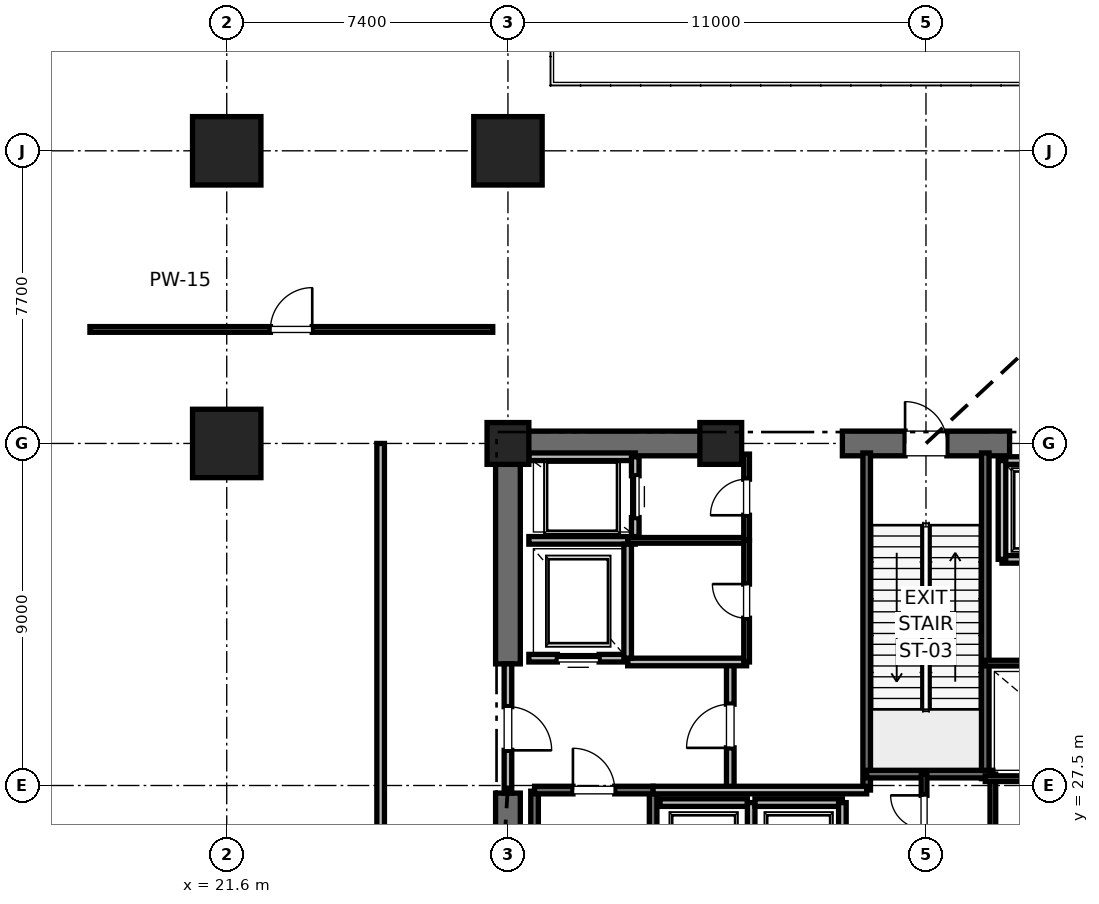
"""IFC4 building model, lengths in metres.
Left out: names, types, materials, properties, quantities, classifications, styles, units other than length and angle.
Written with IfcOpenShell. Run it as: python <this file> out.ifc"""

import sys

from ifc_helpers import new_model, si_unit, direction, frame, frame_2d, origin, origin_2d, place, context, subcontext, project, spatial, rectangle, extrude, element, fill, save


model = new_model("IFC4")
c1 = context("Model", 3, precision=1e-05, world=origin(), true_north=direction((0.0, 1.0)))
c2 = subcontext(c1, "Body", "Model", "MODEL_VIEW")
j1 = project(units=[si_unit("LENGTHUNIT", "METRE"), si_unit("PLANEANGLEUNIT", "RADIAN")], contexts=[c1])
p1 = place(None, origin())
s1 = spatial("IfcSite", under=j1, at=p1, CompositionType="ELEMENT")
p2 = place(p1, origin())
s2 = spatial("IfcBuilding", under=s1, at=p2, CompositionType="ELEMENT")
p3 = place(p2, origin())
s3 = spatial("IfcBuildingStorey", under=s2, at=p3, CompositionType="ELEMENT", Elevation=0.0)
for number, where, z_axis, x_axis in (
    (1, (29.0, 44.2, 0.0), (0.0, 0.0, 1.0), (1.0, 0.0, 0.0)),
    (2, (21.6, 36.5, 0.0), (0.0, 0.0, 1.0), (1.0, 0.0, 0.0)),
    (3, (21.6, 44.2, 0.0), (0.0, 0.0, 1.0), (1.0, 0.0, 0.0)),
):
    element("IfcColumn", number, at=place(p3, frame(where, z_axis=z_axis, x_axis=x_axis)), inside=s3, PredefinedType="COLUMN", context=c2, shape_type="SweptSolid", body=[
        extrude(rectangle(XDim=1.8, YDim=1.8, at=origin_2d()), origin(), (0.0, 0.0, 1.0), 6.0),
    ])
for number, where, z_axis, x_axis in (
    (4, (29.0, 36.5, 0.0), (0.0, 0.0, 1.0), (1.0, 0.0, 0.0)),
    (5, (34.6, 36.5, 0.0), (0.0, 0.0, 1.0), (1.0, 0.0, 0.0)),
):
    element("IfcColumn", number, at=place(p3, frame(where, z_axis=z_axis, x_axis=x_axis)), inside=s3, PredefinedType="PILASTER", context=c2, shape_type="SweptSolid", body=[
        extrude(rectangle(XDim=1.1, YDim=1.1, at=origin_2d()), origin(), (0.0, 0.0, 1.0), 6.0),
    ])
p4 = place(p3, frame((29.0, 36.5, 0.0), z_axis=(0.0, 0.0, 1.0), x_axis=(1.0, 0.0, 0.0)))
e6 = element("IfcWall", 6, at=p4, inside=s3, PredefinedType="SHEAR", context=c2, shape_type="SweptSolid", body=[
    extrude(rectangle(XDim=5.8, YDim=0.65, at=frame_2d((2.9, 0.0))), origin(), (0.0, 0.0, 1.0), 5.72),
])
p5 = place(p3, frame((37.8, 36.5, 0.0), z_axis=(0.0, 0.0, 1.0), x_axis=(1.0, 0.0, 0.0)))
e7 = element("IfcWall", 7, at=p5, inside=s3, PredefinedType="SHEAR", context=c2, shape_type="SweptSolid", body=[
    extrude(rectangle(XDim=4.4, YDim=0.65, at=frame_2d((2.2, 0.0))), origin(), (0.0, 0.0, 1.0), 5.72),
])
p6 = place(p5, frame((1.65, 0.0, 0.0)))
e8 = element("IfcOpeningElement", 8, at=p6, cuts=e7, PredefinedType="OPENING", context=c2, shape_type="SweptSolid", body=[
    extrude(rectangle(XDim=1.1, YDim=2.15, at=frame_2d((0.55, 1.075))), frame((0.0, 0.325, 0.0), z_axis=(0.0, -1.0, 0.0), x_axis=(1.0, 0.0, 0.0)), (0.0, 0.0, 1.0), 0.65),
])
p7 = place(p3, frame((29.0, 18.5, 0.0), z_axis=(0.0, 0.0, 1.0), x_axis=(0.0, 1.0, 0.0)))
e9 = element("IfcWall", 9, at=p7, inside=s3, PredefinedType="SHEAR", context=c2, shape_type="SweptSolid", body=[
    extrude(rectangle(XDim=8.8, YDim=0.65, at=frame_2d((4.4, 0.0))), origin(), (0.0, 0.0, 1.0), 5.72),
])
p8 = place(p3, frame((29.0, 30.7, 0.0), z_axis=(0.0, 0.0, 1.0), x_axis=(0.0, 1.0, 0.0)))
e10 = element("IfcWall", 10, at=p8, inside=s3, PredefinedType="SHEAR", context=c2, shape_type="SweptSolid", body=[
    extrude(rectangle(XDim=5.8, YDim=0.65, at=frame_2d((2.9, 0.0))), origin(), (0.0, 0.0, 1.0), 5.72),
])
p9 = place(p3, frame((29.7, 19.2, 0.0), z_axis=(0.0, 0.0, 1.0), x_axis=(0.0, 1.0, 0.0)))
e11 = element("IfcWall", 11, at=p9, inside=s3, PredefinedType="SOLIDWALL", context=c2, shape_type="SweptSolid", body=[
    extrude(rectangle(XDim=8.15, YDim=0.2, at=frame_2d((4.075, 0.0))), origin(), (0.0, 0.0, 1.0), 5.72),
])
p10 = place(p3, frame((32.82, 18.6, 0.0), z_axis=(0.0, 0.0, 1.0), x_axis=(0.0, 1.0, 0.0)))
e12 = element("IfcWall", 12, at=p10, inside=s3, PredefinedType="SOLIDWALL", context=c2, shape_type="SweptSolid", body=[
    extrude(rectangle(XDim=8.78, YDim=0.2, at=frame_2d((4.39, 0.0))), origin(), (0.0, 0.0, 1.0), 5.72),
])
p11 = place(p3, frame((29.7, 27.38, 0.0), z_axis=(0.0, 0.0, 1.0), x_axis=(1.0, 0.0, 0.0)))
e13 = element("IfcWall", 13, at=p11, inside=s3, PredefinedType="SOLIDWALL", context=c2, shape_type="SweptSolid", body=[
    extrude(rectangle(XDim=3.12, YDim=0.2, at=frame_2d((1.56, 0.0))), origin(), (0.0, 0.0, 1.0), 5.72),
])
p12 = place(p11, frame((1.01, 0.0, 0.0)))
e14 = element("IfcOpeningElement", 14, at=p12, cuts=e13, PredefinedType="OPENING", context=c2, shape_type="SweptSolid", body=[
    extrude(rectangle(XDim=1.1, YDim=2.15, at=frame_2d((0.55, 1.075))), frame((0.0, 0.1, 0.0), z_axis=(0.0, -1.0, 0.0), x_axis=(1.0, 0.0, 0.0)), (0.0, 0.0, 1.0), 0.2),
])
p13 = place(p3, frame((38.44, 27.38, 0.0), z_axis=(0.0, 0.0, 1.0), x_axis=(0.0, 1.0, 0.0)))
e15 = element("IfcWall", 15, at=p13, inside=s3, PredefinedType="SOLIDWALL", context=c2, shape_type="SweptSolid", body=[
    extrude(rectangle(XDim=8.87, YDim=0.2, at=frame_2d((4.435, 0.0))), origin(), (0.0, 0.0, 1.0), 5.72),
])
p14 = place(p3, frame((41.56, 27.68, 0.0), z_axis=(0.0, 0.0, 1.0), x_axis=(0.0, 1.0, 0.0)))
e16 = element("IfcWall", 16, at=p14, inside=s3, PredefinedType="SOLIDWALL", context=c2, shape_type="SweptSolid", body=[
    extrude(rectangle(XDim=8.57, YDim=0.2, at=frame_2d((4.285, 0.0))), origin(), (0.0, 0.0, 1.0), 5.72),
])
p15 = place(p3, frame((38.44, 27.8, 0.0), z_axis=(0.0, 0.0, 1.0), x_axis=(1.0, 0.0, 0.0)))
e17 = element("IfcWall", 17, at=p15, inside=s3, PredefinedType="SOLIDWALL", context=c2, shape_type="SweptSolid", body=[
    extrude(rectangle(XDim=3.32, YDim=0.2, at=frame_2d((1.66, 0.0))), origin(), (0.0, 0.0, 1.0), 5.72),
])
p16 = place(p3, frame((34.85, 27.38, 0.0), z_axis=(0.0, 0.0, 1.0), x_axis=(0.0, 1.0, 0.0)))
e18 = element("IfcWall", 18, at=p16, inside=s3, PredefinedType="PARTITIONING", context=c2, shape_type="SweptSolid", body=[
    extrude(rectangle(XDim=3.37, YDim=0.2, at=frame_2d((1.685, 0.0))), origin(), (0.0, 0.0, 1.0), 5.72),
])
p17 = place(p16, frame((1.11, 0.0, 0.0)))
e19 = element("IfcOpeningElement", 19, at=p17, cuts=e18, PredefinedType="OPENING", context=c2, shape_type="SweptSolid", body=[
    extrude(rectangle(XDim=1.15, YDim=2.2, at=frame_2d((0.575, 1.1))), frame((0.0, 0.1, 0.0), z_axis=(0.0, -1.0, 0.0), x_axis=(1.0, 0.0, 0.0)), (0.0, 0.0, 1.0), 0.2),
])
p18 = place(p3, frame((29.0, 30.7, 0.0), z_axis=(0.0, 0.0, 1.0), x_axis=(0.0, -1.0, 0.0)))
e20 = element("IfcWall", 20, at=p18, inside=s3, PredefinedType="PARTITIONING", context=c2, shape_type="SweptSolid", body=[
    extrude(rectangle(XDim=3.4, YDim=0.2, at=frame_2d((1.7, 0.0))), origin(), (0.0, 0.0, 1.0), 4.5),
])
p19 = place(p18, frame((1.125, 0.0, 0.0)))
e21 = element("IfcOpeningElement", 21, at=p19, cuts=e20, PredefinedType="OPENING", context=c2, shape_type="SweptSolid", body=[
    extrude(rectangle(XDim=1.15, YDim=2.2, at=frame_2d((0.575, 1.1))), frame((0.0, 0.1, 0.0), z_axis=(0.0, -1.0, 0.0), x_axis=(1.0, 0.0, 0.0)), (0.0, 0.0, 1.0), 0.2),
])
p20 = place(p3, frame((32.82, 27.38, 0.0), z_axis=(0.0, 0.0, 1.0), x_axis=(1.0, 0.0, 0.0)))
e22 = element("IfcWall", 22, at=p20, inside=s3, PredefinedType="PARTITIONING", context=c2, shape_type="SweptSolid", body=[
    extrude(rectangle(XDim=5.62, YDim=0.2, at=frame_2d((2.81, 0.0))), origin(), (0.0, 0.0, 1.0), 5.72),
])
p21 = place(p3, frame((32.15, 30.75, 0.0), z_axis=(0.0, 0.0, 1.0), x_axis=(1.0, 0.0, 0.0)))
e23 = element("IfcWall", 23, at=p21, inside=s3, PredefinedType="PARTITIONING", context=c2, shape_type="SweptSolid", body=[
    extrude(rectangle(XDim=3.13, YDim=0.2, at=frame_2d((1.565, 0.0))), origin(), (0.0, 0.0, 1.0), 5.72),
])
p22 = place(p3, frame((29.55, 30.85, 0.0), z_axis=(0.0, 0.0, 1.0), x_axis=(1.0, 0.0, 0.0)))
e24 = element("IfcWall", 24, at=p22, inside=s3, PredefinedType="SOLIDWALL", context=c2, shape_type="SweptSolid", body=[
    extrude(rectangle(XDim=2.6, YDim=0.2, at=frame_2d((1.3, 0.0))), origin(), (0.0, 0.0, 1.0), 4.5),
])
p23 = place(p22, frame((0.75, 0.0, 0.0)))
e25 = element("IfcOpeningElement", 25, at=p23, cuts=e24, PredefinedType="OPENING", context=c2, shape_type="SweptSolid", body=[
    extrude(rectangle(XDim=1.1, YDim=2.2, at=frame_2d((0.55, 1.1))), frame((0.0, 0.1, 0.0), z_axis=(0.0, -1.0, 0.0), x_axis=(1.0, 0.0, 0.0)), (0.0, 0.0, 1.0), 0.2),
])
p24 = place(p3, frame((29.55, 33.95, 0.0), z_axis=(0.0, 0.0, 1.0), x_axis=(1.0, 0.0, 0.0)))
e26 = element("IfcWall", 26, at=p24, inside=s3, PredefinedType="SOLIDWALL", context=c2, shape_type="SweptSolid", body=[
    extrude(rectangle(XDim=2.8, YDim=0.2, at=frame_2d((1.4, 0.0))), origin(), (0.0, 0.0, 1.0), 5.72),
])
p25 = place(p3, frame((32.15, 30.85, 0.0), z_axis=(0.0, 0.0, 1.0), x_axis=(0.0, 1.0, 0.0)))
e27 = element("IfcWall", 27, at=p25, inside=s3, PredefinedType="SOLIDWALL", context=c2, shape_type="SweptSolid", body=[
    extrude(rectangle(XDim=3.0, YDim=0.2, at=frame_2d((1.5, 0.0))), origin(), (0.0, 0.0, 1.0), 5.72),
])
p26 = place(p3, frame((32.35, 36.15, 0.0), z_axis=(0.0, 0.0, 1.0), x_axis=(-1.0, 0.0, 0.0)))
e28 = element("IfcWall", 28, at=p26, inside=s3, PredefinedType="SOLIDWALL", context=c2, shape_type="SweptSolid", body=[
    extrude(rectangle(XDim=2.8, YDim=0.2, at=frame_2d((1.4, 0.0))), origin(), (0.0, 0.0, 1.0), 4.779),
])
p27 = place(p3, frame((32.35, 34.05, 0.0), z_axis=(0.0, 0.0, 1.0), x_axis=(0.0, 1.0, 0.0)))
e29 = element("IfcWall", 29, at=p27, inside=s3, PredefinedType="SOLIDWALL", context=c2, shape_type="SweptSolid", body=[
    extrude(rectangle(XDim=2.1, YDim=0.2, at=frame_2d((1.05, 0.0))), origin(), (0.0, 0.0, 1.0), 5.72),
])
p28 = place(p27, frame((0.5, 0.0, 0.0)))
e30 = element("IfcOpeningElement", 30, at=p28, cuts=e29, PredefinedType="OPENING", context=c2, shape_type="SweptSolid", body=[
    extrude(rectangle(XDim=1.1, YDim=2.2, at=frame_2d((0.55, 1.1))), frame((0.0, 0.1, 0.0), z_axis=(0.0, -1.0, 0.0), x_axis=(1.0, 0.0, 0.0)), (0.0, 0.0, 1.0), 0.2),
])
p29 = place(p3, frame((35.3, 27.05, 0.0), z_axis=(0.0, 0.0, 1.0), x_axis=(-1.0, 0.0, 0.0)))
e31 = element("IfcWall", 31, at=p29, inside=s3, PredefinedType="SOLIDWALL", context=c2, shape_type="SweptSolid", body=[
    extrude(rectangle(XDim=2.3, YDim=0.2, at=frame_2d((1.15, 0.0))), origin(), (0.0, 0.0, 1.0), 5.72),
])
p30 = place(p3, frame((35.4, 24.45, 0.0), z_axis=(0.0, 0.0, 1.0), x_axis=(0.0, 1.0, 0.0)))
e32 = element("IfcWall", 32, at=p30, inside=s3, PredefinedType="SOLIDWALL", context=c2, shape_type="SweptSolid", body=[
    extrude(rectangle(XDim=2.6, YDim=0.2, at=frame_2d((1.3, 0.0))), origin(), (0.0, 0.0, 1.0), 5.72),
])
p31 = place(p3, frame((37.8, 27.05, 0.0), z_axis=(0.0, 0.0, 1.0), x_axis=(-1.0, 0.0, 0.0)))
e33 = element("IfcWall", 33, at=p31, inside=s3, PredefinedType="SOLIDWALL", context=c2, shape_type="SweptSolid", body=[
    extrude(rectangle(XDim=2.3, YDim=0.2, at=frame_2d((1.15, 0.0))), origin(), (0.0, 0.0, 1.0), 5.72),
])
p32 = place(p3, frame((37.8, 24.45, 0.0), z_axis=(0.0, 0.0, 1.0), x_axis=(0.0, 1.0, 0.0)))
e34 = element("IfcWall", 34, at=p32, inside=s3, PredefinedType="SOLIDWALL", context=c2, shape_type="SweptSolid", body=[
    extrude(rectangle(XDim=2.6, YDim=0.2, at=frame_2d((1.3, 0.0))), origin(), (0.0, 0.0, 1.0), 5.72),
])
p33 = place(p3, frame((42.0, 33.45, 0.0), z_axis=(0.0, 0.0, 1.0), x_axis=(1.0, 0.0, 0.0)))
e35 = element("IfcWall", 35, at=p33, inside=s3, PredefinedType="SOLIDWALL", context=c2, shape_type="SweptSolid", body=[
    extrude(rectangle(XDim=2.3, YDim=0.2, at=frame_2d((1.15, 0.0))), origin(), (0.0, 0.0, 1.0), 5.72),
])
p34 = place(p33, frame((0.6, 0.0, 0.0)))
e36 = element("IfcOpeningElement", 36, at=p34, cuts=e35, PredefinedType="OPENING", context=c2, shape_type="SweptSolid", body=[
    extrude(rectangle(XDim=1.1, YDim=2.2, at=frame_2d((0.55, 1.1))), frame((0.0, 0.1, 0.0), z_axis=(0.0, -1.0, 0.0), x_axis=(1.0, 0.0, 0.0)), (0.0, 0.0, 1.0), 0.2),
])
p35 = place(p3, frame((44.3, 36.05, 0.0), z_axis=(0.0, 0.0, 1.0), x_axis=(-1.0, 0.0, 0.0)))
e37 = element("IfcWall", 37, at=p35, inside=s3, PredefinedType="SOLIDWALL", context=c2, shape_type="SweptSolid", body=[
    extrude(rectangle(XDim=2.3, YDim=0.2, at=frame_2d((1.15, 0.0))), origin(), (0.0, 0.0, 1.0), 4.5),
])
p36 = place(p3, frame((42.0, 36.05, 0.0), z_axis=(0.0, 0.0, 1.0), x_axis=(0.0, -1.0, 0.0)))
e38 = element("IfcWall", 38, at=p36, inside=s3, PredefinedType="SOLIDWALL", context=c2, shape_type="SweptSolid", body=[
    extrude(rectangle(XDim=2.6, YDim=0.2, at=frame_2d((1.3, 0.0))), origin(), (0.0, 0.0, 1.0), 4.5),
])
p37 = place(p3, frame((41.76, 23.8, 0.0), z_axis=(0.0, 0.0, 1.0), x_axis=(0.0, 1.0, 0.0)))
e39 = element("IfcWall", 39, at=p37, inside=s3, PredefinedType="PARTITIONING", context=c2, shape_type="SweptSolid", body=[
    extrude(rectangle(XDim=4.0, YDim=0.15, at=frame_2d((2.0, 0.0))), origin(), (0.0, 0.0, 1.0), 2.85),
])
p38 = place(p3, frame((39.95, 25.8, 0.0), z_axis=(0.0, 0.0, 1.0), x_axis=(0.0, 1.0, 0.0)))
e40 = element("IfcWall", 40, at=p38, inside=s3, PredefinedType="PARTITIONING", context=c2, shape_type="SweptSolid", body=[
    extrude(rectangle(XDim=2.0, YDim=0.15, at=frame_2d((1.0, 0.0))), origin(), (0.0, 0.0, 1.0), 2.85),
])
p39 = place(p38, frame((0.56, 0.0, 0.0)))
e41 = element("IfcOpeningElement", 41, at=p39, cuts=e40, PredefinedType="OPENING", context=c2, shape_type="SweptSolid", body=[
    extrude(rectangle(XDim=0.88, YDim=2.1, at=frame_2d((0.44, 1.05))), frame((0.0, 0.075, 0.0), z_axis=(0.0, -1.0, 0.0), x_axis=(1.0, 0.0, 0.0)), (0.0, 0.0, 1.0), 0.15),
])
p40 = place(p3, frame((32.15, 33.95, 0.0), z_axis=(0.0, 0.0, 1.0), x_axis=(1.0, 0.0, 0.0)))
e42 = element("IfcWall", 42, at=p40, inside=s3, PredefinedType="PARTITIONING", context=c2, shape_type="SweptSolid", body=[
    extrude(rectangle(XDim=3.13, YDim=0.15, at=frame_2d((1.565, 0.0))), origin(), (0.0, 0.0, 1.0), 2.85),
])
p41 = place(p3, frame((35.28, 33.95, 0.0), z_axis=(0.0, 0.0, 1.0), x_axis=(0.0, 1.0, 0.0)))
e43 = element("IfcWall", 43, at=p41, inside=s3, PredefinedType="PARTITIONING", context=c2, shape_type="SweptSolid", body=[
    extrude(rectangle(XDim=2.27, YDim=0.15, at=frame_2d((1.135, 0.0))), origin(), (0.0, 0.0, 1.0), 2.85),
])
p42 = place(p41, frame((0.66, 0.0, 0.0)))
e44 = element("IfcOpeningElement", 44, at=p42, cuts=e43, PredefinedType="OPENING", context=c2, shape_type="SweptSolid", body=[
    extrude(rectangle(XDim=0.95, YDim=2.15, at=frame_2d((0.475, 1.075))), frame((0.0, 0.075, 0.0), z_axis=(0.0, -1.0, 0.0), x_axis=(1.0, 0.0, 0.0)), (0.0, 0.0, 1.0), 0.15),
])
p43 = place(p3, frame((35.28, 30.75, 0.0), z_axis=(0.0, 0.0, 1.0), x_axis=(0.0, 1.0, 0.0)))
e45 = element("IfcWall", 45, at=p43, inside=s3, PredefinedType="PARTITIONING", context=c2, shape_type="SweptSolid", body=[
    extrude(rectangle(XDim=3.2, YDim=0.15, at=frame_2d((1.6, 0.0))), origin(), (0.0, 0.0, 1.0), 2.85),
])
p44 = place(p43, frame((1.15, 0.0, 0.0)))
e46 = element("IfcOpeningElement", 46, at=p44, cuts=e45, PredefinedType="OPENING", context=c2, shape_type="SweptSolid", body=[
    extrude(rectangle(XDim=0.9, YDim=2.1, at=frame_2d((0.45, 1.05))), frame((0.0, 0.075, 0.0), z_axis=(0.0, -1.0, 0.0), x_axis=(1.0, 0.0, 0.0)), (0.0, 0.0, 1.0), 0.15),
])
p45 = place(p3, frame((41.56, 27.68, 0.0), z_axis=(0.0, 0.0, 1.0), x_axis=(1.0, 0.0, 0.0)))
e47 = element("IfcWall", 47, at=p45, inside=s3, PredefinedType="PARTITIONING", context=c2, shape_type="SweptSolid", body=[
    extrude(rectangle(XDim=3.59, YDim=0.15, at=frame_2d((1.795, 0.0))), origin(), (0.0, 0.0, 1.0), 2.85),
])
p46 = place(p3, frame((41.56, 30.72, 0.0), z_axis=(0.0, 0.0, 1.0), x_axis=(1.0, 0.0, 0.0)))
e48 = element("IfcWall", 48, at=p46, inside=s3, PredefinedType="PARTITIONING", context=c2, shape_type="SweptSolid", body=[
    extrude(rectangle(XDim=3.59, YDim=0.15, at=frame_2d((1.795, 0.0))), origin(), (0.0, 0.0, 1.0), 2.85),
])
p47 = place(p46, frame((1.355, 0.0, 0.0)))
e49 = element("IfcOpeningElement", 49, at=p47, cuts=e48, PredefinedType="OPENING", context=c2, shape_type="SweptSolid", body=[
    extrude(rectangle(XDim=0.88, YDim=2.1, at=frame_2d((0.44, 1.05))), frame((0.0, 0.075, 0.0), z_axis=(0.0, -1.0, 0.0), x_axis=(1.0, 0.0, 0.0)), (0.0, 0.0, 1.0), 0.15),
])
p48 = place(p3, frame((25.65, -1.35, 0.0), z_axis=(0.0, 0.0, 1.0), x_axis=(0.0, 1.0, 0.0)))
e50 = element("IfcWall", 50, at=p48, inside=s3, PredefinedType="PARTITIONING", context=c2, shape_type="SweptSolid", body=[
    extrude(rectangle(XDim=37.85, YDim=0.2, at=frame_2d((18.925, 0.0))), origin(), (0.0, 0.0, 1.0), 2.85),
])
p49 = place(p48, frame((17.775, 0.0, 0.0)))
e51 = element("IfcOpeningElement", 51, at=p49, cuts=e50, PredefinedType="OPENING", context=c2, shape_type="SweptSolid", body=[
    extrude(rectangle(XDim=1.15, YDim=2.2, at=frame_2d((0.575, 1.1))), frame((0.0, 0.1, 0.0), z_axis=(0.0, -1.0, 0.0), x_axis=(1.0, 0.0, 0.0)), (0.0, 0.0, 1.0), 0.2),
])
p50 = place(p3, frame((18.0, 39.5, 0.0), z_axis=(0.0, 0.0, 1.0), x_axis=(1.0, 0.0, 0.0)))
e52 = element("IfcWall", 52, at=p50, inside=s3, PredefinedType="PARTITIONING", context=c2, shape_type="SweptSolid", body=[
    extrude(rectangle(XDim=10.6, YDim=0.15, at=frame_2d((5.3, 0.0))), origin(), (0.0, 0.0, 1.0), 2.85),
])
p51 = place(p50, frame((4.75, 0.0, 0.0)))
e53 = element("IfcOpeningElement", 53, at=p51, cuts=e52, PredefinedType="OPENING", context=c2, shape_type="SweptSolid", body=[
    extrude(rectangle(XDim=1.1, YDim=2.15, at=frame_2d((0.55, 1.075))), frame((0.0, 0.075, 0.0), z_axis=(0.0, -1.0, 0.0), x_axis=(1.0, 0.0, 0.0)), (0.0, 0.0, 1.0), 0.15),
])
p52 = place(p12, origin())
e54 = element("IfcDoor", 54, at=p52, inside=s3, OperationType="SINGLE_SWING_LEFT", PredefinedType="DOOR", context=c2, shape_type="SweptSolid", body=[
    extrude(rectangle(XDim=1.1, YDim=2.15, at=frame_2d((0.55, 1.075))), frame((0.0, 0.025, 0.0), z_axis=(0.0, -1.0, 0.0), x_axis=(1.0, 0.0, 0.0)), (0.0, 0.0, 1.0), 0.05),
])
fill(e14, e54)
p53 = place(p6, origin())
e55 = element("IfcDoor", 55, at=p53, inside=s3, OperationType="SINGLE_SWING_LEFT", PredefinedType="DOOR", context=c2, shape_type="SweptSolid", body=[
    extrude(rectangle(XDim=1.1, YDim=2.15, at=frame_2d((0.55, 1.075))), frame((0.0, 0.025, 0.0), z_axis=(0.0, -1.0, 0.0), x_axis=(1.0, 0.0, 0.0)), (0.0, 0.0, 1.0), 0.05),
])
fill(e8, e55)
p54 = place(p17, origin())
e56 = element("IfcDoor", 56, at=p54, inside=s3, OperationType="SINGLE_SWING_LEFT", PredefinedType="DOOR", context=c2, shape_type="SweptSolid", body=[
    extrude(rectangle(XDim=1.15, YDim=2.2, at=frame_2d((0.575, 1.1))), frame((0.0, 0.025, 0.0), z_axis=(0.0, -1.0, 0.0), x_axis=(1.0, 0.0, 0.0)), (0.0, 0.0, 1.0), 0.05),
])
fill(e19, e56)
p55 = place(p19, origin())
e57 = element("IfcDoor", 57, at=p55, inside=s3, OperationType="SINGLE_SWING_RIGHT", PredefinedType="DOOR", context=c2, shape_type="SweptSolid", body=[
    extrude(rectangle(XDim=1.15, YDim=2.2, at=frame_2d((0.575, 1.1))), frame((0.0, 0.025, 0.0), z_axis=(0.0, -1.0, 0.0), x_axis=(1.0, 0.0, 0.0)), (0.0, 0.0, 1.0), 0.05),
])
fill(e21, e57)
p56 = place(p23, origin())
e58 = element("IfcDoor", 58, at=p56, inside=s3, OperationType="SLIDING_TO_RIGHT", PredefinedType="DOOR", context=c2, shape_type="SweptSolid", body=[
    extrude(rectangle(XDim=1.1, YDim=2.2, at=frame_2d((0.55, 1.1))), frame((0.0, 0.025, 0.0), z_axis=(0.0, -1.0, 0.0), x_axis=(1.0, 0.0, 0.0)), (0.0, 0.0, 1.0), 0.05),
])
fill(e25, e58)
p57 = place(p28, origin())
e59 = element("IfcDoor", 59, at=p57, inside=s3, OperationType="SLIDING_TO_RIGHT", PredefinedType="DOOR", context=c2, shape_type="SweptSolid", body=[
    extrude(rectangle(XDim=1.1, YDim=2.2, at=frame_2d((0.55, 1.1))), frame((0.0, 0.025, 0.0), z_axis=(0.0, -1.0, 0.0), x_axis=(1.0, 0.0, 0.0)), (0.0, 0.0, 1.0), 0.05),
])
fill(e30, e59)
p58 = place(p39, origin())
e60 = element("IfcDoor", 60, at=p58, inside=s3, OperationType="SINGLE_SWING_RIGHT", PredefinedType="DOOR", context=c2, shape_type="SweptSolid", body=[
    extrude(rectangle(XDim=0.88, YDim=2.1, at=frame_2d((0.44, 1.05))), frame((0.0, 0.025, 0.0), z_axis=(0.0, -1.0, 0.0), x_axis=(1.0, 0.0, 0.0)), (0.0, 0.0, 1.0), 0.05),
])
fill(e41, e60)
p59 = place(p42, origin())
e61 = element("IfcDoor", 61, at=p59, inside=s3, OperationType="SINGLE_SWING_LEFT", PredefinedType="DOOR", context=c2, shape_type="SweptSolid", body=[
    extrude(rectangle(XDim=0.95, YDim=2.15, at=frame_2d((0.475, 1.075))), frame((0.0, 0.025, 0.0), z_axis=(0.0, -1.0, 0.0), x_axis=(1.0, 0.0, 0.0)), (0.0, 0.0, 1.0), 0.05),
])
fill(e44, e61)
p60 = place(p44, origin())
e62 = element("IfcDoor", 62, at=p60, inside=s3, OperationType="SINGLE_SWING_RIGHT", PredefinedType="DOOR", context=c2, shape_type="SweptSolid", body=[
    extrude(rectangle(XDim=0.9, YDim=2.1, at=frame_2d((0.45, 1.05))), frame((0.0, 0.025, 0.0), z_axis=(0.0, -1.0, 0.0), x_axis=(1.0, 0.0, 0.0)), (0.0, 0.0, 1.0), 0.05),
])
fill(e46, e62)
p61 = place(p51, origin())
e63 = element("IfcDoor", 63, at=p61, inside=s3, OperationType="SINGLE_SWING_RIGHT", PredefinedType="DOOR", context=c2, shape_type="SweptSolid", body=[
    extrude(rectangle(XDim=1.1, YDim=2.15, at=frame_2d((0.55, 1.075))), frame((0.0, 0.025, 0.0), z_axis=(0.0, -1.0, 0.0), x_axis=(1.0, 0.0, 0.0)), (0.0, 0.0, 1.0), 0.05),
])
fill(e53, e63)
save(model, sys.argv[1])
